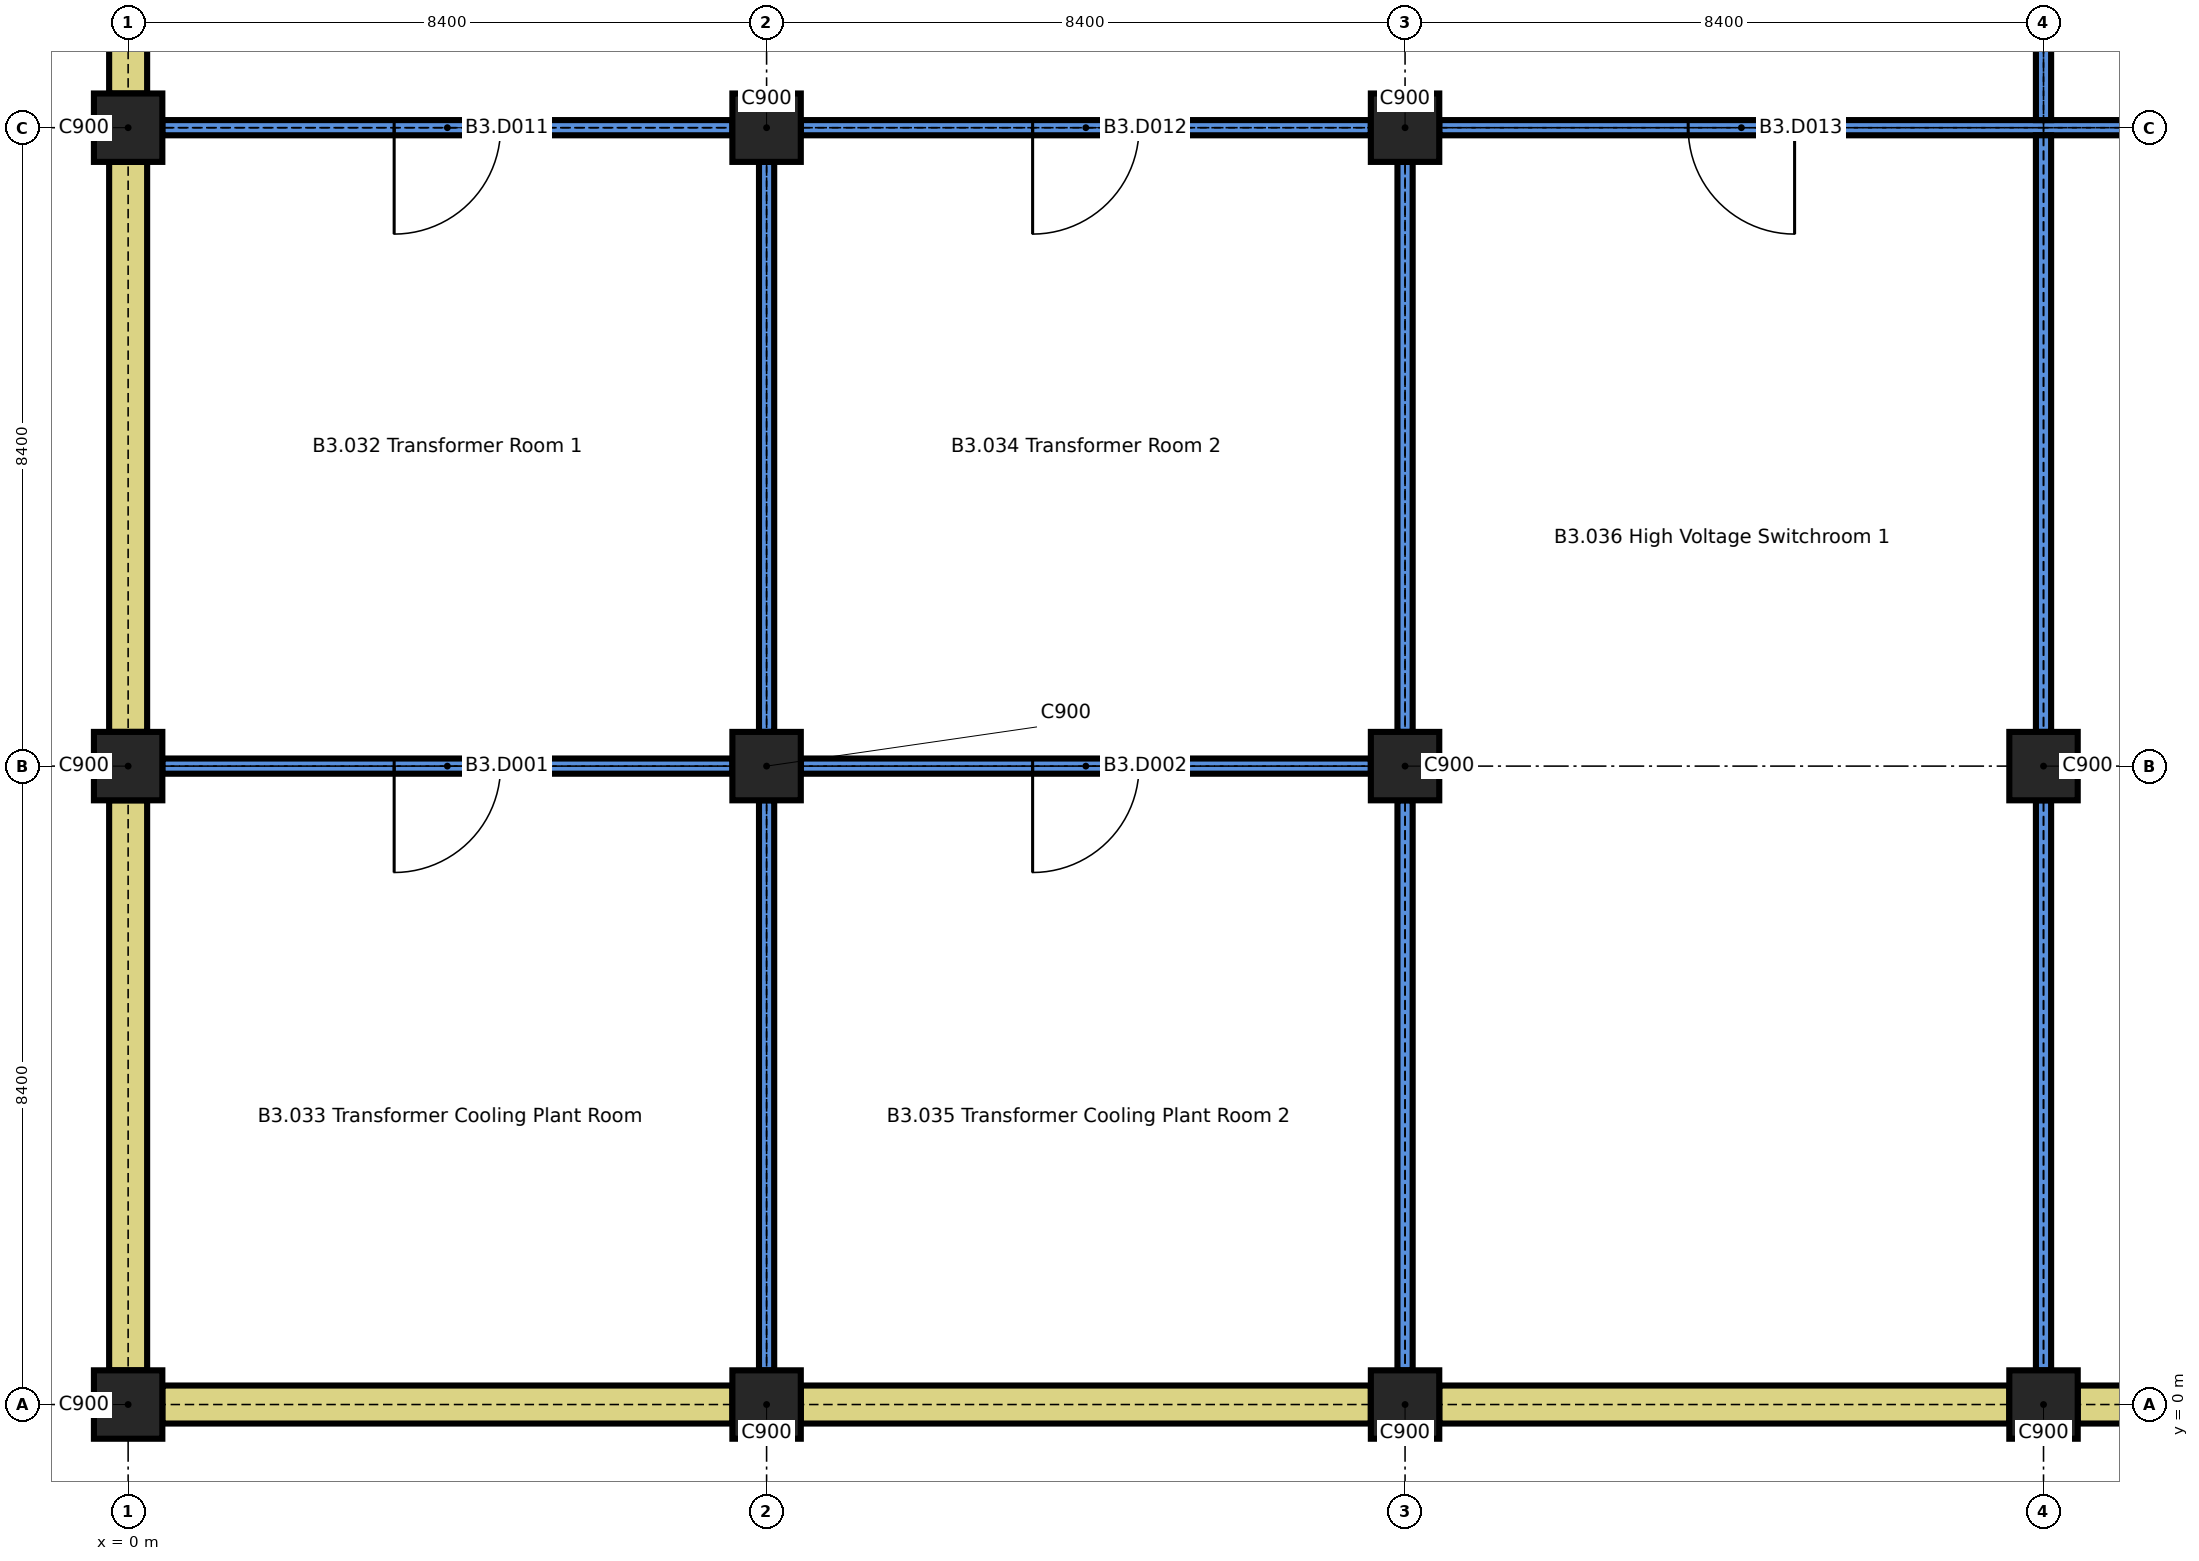
"""IFC4 building model, lengths in metres.
Left out: names, types, materials, properties, quantities, classifications, styles, units other than length and angle.
Written with IfcOpenShell. Run it as: python <this file> out.ifc"""

import sys

from ifc_helpers import new_model, si_unit, direction, frame, frame_2d, origin, origin_2d, place, context, subcontext, project, spatial, rectangle, extrude, element, fill, save


model = new_model("IFC4")
c1 = context("Model", 3, precision=1e-05, world=origin(), true_north=direction((0.0, 1.0)))
c2 = subcontext(c1, "Body", "Model", "MODEL_VIEW")
j1 = project(units=[si_unit("LENGTHUNIT", "METRE"), si_unit("PLANEANGLEUNIT", "RADIAN")], contexts=[c1])
p1 = place(None, origin())
s1 = spatial("IfcSite", under=j1, at=p1, CompositionType="ELEMENT")
p2 = place(p1, origin())
s2 = spatial("IfcBuilding", under=s1, at=p2, CompositionType="ELEMENT")
p3 = place(p2, frame((0.0, 0.0, -11.4)))
s3 = spatial("IfcBuildingStorey", under=s2, at=p3, CompositionType="ELEMENT", Elevation=-11.4)
for number, where, z_axis, x_axis in (
    (1, (0.0, 0.0, 0.0), (0.0, 0.0, 1.0), (1.0, 0.0, 0.0)),
    (2, (8.4, 0.0, 0.0), (0.0, 0.0, 1.0), (1.0, 0.0, 0.0)),
    (3, (16.8, 0.0, 0.0), (0.0, 0.0, 1.0), (1.0, 0.0, 0.0)),
    (4, (25.2, 0.0, 0.0), (0.0, 0.0, 1.0), (1.0, 0.0, 0.0)),
    (5, (0.0, 8.4, 0.0), (0.0, 0.0, 1.0), (1.0, 0.0, 0.0)),
    (6, (8.4, 8.4, 0.0), (0.0, 0.0, 1.0), (1.0, 0.0, 0.0)),
    (7, (16.8, 8.4, 0.0), (0.0, 0.0, 1.0), (1.0, 0.0, 0.0)),
    (8, (25.2, 8.4, 0.0), (0.0, 0.0, 1.0), (1.0, 0.0, 0.0)),
    (9, (0.0, 16.8, 0.0), (0.0, 0.0, 1.0), (1.0, 0.0, 0.0)),
    (10, (8.4, 16.8, 0.0), (0.0, 0.0, 1.0), (1.0, 0.0, 0.0)),
    (11, (16.8, 16.8, 0.0), (0.0, 0.0, 1.0), (1.0, 0.0, 0.0)),
):
    element("IfcColumn", number, at=place(p3, frame(where, z_axis=z_axis, x_axis=x_axis)), inside=s3, PredefinedType="COLUMN", context=c2, shape_type="SweptSolid", body=[
        extrude(rectangle(XDim=0.9, YDim=0.9, at=origin_2d()), origin(), (0.0, 0.0, 1.0), 3.2),
    ])
for number, where, z_axis, x_axis in (
    (12, (0.45, 0.0, 0.0), (0.0, 0.0, 1.0), (1.0, 0.0, 0.0)),
    (13, (8.85, 0.0, 0.0), (0.0, 0.0, 1.0), (1.0, 0.0, 0.0)),
    (14, (17.25, 0.0, 0.0), (0.0, 0.0, 1.0), (1.0, 0.0, 0.0)),
    (15, (25.65, 0.0, 0.0), (0.0, 0.0, 1.0), (1.0, 0.0, 0.0)),
    (16, (0.0, 0.45, 0.0), (0.0, 0.0, 1.0), (0.0, 1.0, 0.0)),
    (17, (0.0, 8.85, 0.0), (0.0, 0.0, 1.0), (0.0, 1.0, 0.0)),
):
    element("IfcWall", number, at=place(p3, frame(where, z_axis=z_axis, x_axis=x_axis)), inside=s3, PredefinedType="SOLIDWALL", context=c2, shape_type="SweptSolid", body=[
        extrude(rectangle(XDim=7.5, YDim=0.5, at=frame_2d((3.75, 0.0))), origin(), (0.0, 0.0, 1.0), 3.2),
    ])
p4 = place(p3, frame((0.0, 17.25, 0.0), z_axis=(0.0, 0.0, 1.0), x_axis=(0.0, 1.0, 0.0)))
e18 = element("IfcWall", 18, at=p4, inside=s3, PredefinedType="SOLIDWALL", context=c2, shape_type="SweptSolid", body=[
    extrude(rectangle(XDim=16.6, YDim=0.5, at=frame_2d((8.3, 0.0))), origin(), (0.0, 0.0, 1.0), 3.2),
])
p5 = place(p3, frame((0.45, 8.4, 0.0), z_axis=(0.0, 0.0, 1.0), x_axis=(1.0, 0.0, 0.0)))
e19 = element("IfcWall", 19, at=p5, inside=s3, PredefinedType="PARTITIONING", context=c2, shape_type="SweptSolid", body=[
    extrude(rectangle(XDim=7.5, YDim=0.2, at=frame_2d((3.75, 0.0))), origin(), (0.0, 0.0, 1.0), 3.2),
])
p6 = place(p5, frame((3.05, 0.0, 0.0)))
e20 = element("IfcOpeningElement", 20, at=p6, cuts=e19, PredefinedType="OPENING", context=c2, shape_type="SweptSolid", body=[
    extrude(rectangle(XDim=1.4, YDim=2.1, at=frame_2d((0.7, 1.05))), frame((0.0, 0.11, 0.0), z_axis=(0.0, -1.0, 0.0), x_axis=(1.0, 0.0, 0.0)), (0.0, 0.0, 1.0), 0.22),
])
p7 = place(p3, frame((8.85, 8.4, 0.0), z_axis=(0.0, 0.0, 1.0), x_axis=(1.0, 0.0, 0.0)))
e21 = element("IfcWall", 21, at=p7, inside=s3, PredefinedType="PARTITIONING", context=c2, shape_type="SweptSolid", body=[
    extrude(rectangle(XDim=7.5, YDim=0.2, at=frame_2d((3.75, 0.0))), origin(), (0.0, 0.0, 1.0), 3.2),
])
p8 = place(p7, frame((3.05, 0.0, 0.0)))
e22 = element("IfcOpeningElement", 22, at=p8, cuts=e21, PredefinedType="OPENING", context=c2, shape_type="SweptSolid", body=[
    extrude(rectangle(XDim=1.4, YDim=2.1, at=frame_2d((0.7, 1.05))), frame((0.0, 0.11, 0.0), z_axis=(0.0, -1.0, 0.0), x_axis=(1.0, 0.0, 0.0)), (0.0, 0.0, 1.0), 0.22),
])
p9 = place(p3, frame((0.45, 16.8, 0.0), z_axis=(0.0, 0.0, 1.0), x_axis=(1.0, 0.0, 0.0)))
e23 = element("IfcWall", 23, at=p9, inside=s3, PredefinedType="PARTITIONING", context=c2, shape_type="SweptSolid", body=[
    extrude(rectangle(XDim=7.5, YDim=0.2, at=frame_2d((3.75, 0.0))), origin(), (0.0, 0.0, 1.0), 3.2),
])
p10 = place(p9, frame((3.05, 0.0, 0.0)))
e24 = element("IfcOpeningElement", 24, at=p10, cuts=e23, PredefinedType="OPENING", context=c2, shape_type="SweptSolid", body=[
    extrude(rectangle(XDim=1.4, YDim=2.1, at=frame_2d((0.7, 1.05))), frame((0.0, 0.11, 0.0), z_axis=(0.0, -1.0, 0.0), x_axis=(1.0, 0.0, 0.0)), (0.0, 0.0, 1.0), 0.22),
])
p11 = place(p3, frame((8.85, 16.8, 0.0), z_axis=(0.0, 0.0, 1.0), x_axis=(1.0, 0.0, 0.0)))
e25 = element("IfcWall", 25, at=p11, inside=s3, PredefinedType="PARTITIONING", context=c2, shape_type="SweptSolid", body=[
    extrude(rectangle(XDim=7.5, YDim=0.2, at=frame_2d((3.75, 0.0))), origin(), (0.0, 0.0, 1.0), 3.2),
])
p12 = place(p11, frame((3.05, 0.0, 0.0)))
e26 = element("IfcOpeningElement", 26, at=p12, cuts=e25, PredefinedType="OPENING", context=c2, shape_type="SweptSolid", body=[
    extrude(rectangle(XDim=1.4, YDim=2.1, at=frame_2d((0.7, 1.05))), frame((0.0, 0.11, 0.0), z_axis=(0.0, -1.0, 0.0), x_axis=(1.0, 0.0, 0.0)), (0.0, 0.0, 1.0), 0.22),
])
p13 = place(p3, frame((17.25, 16.8, 0.0), z_axis=(0.0, 0.0, 1.0), x_axis=(1.0, 0.0, 0.0)))
e27 = element("IfcWall", 27, at=p13, inside=s3, PredefinedType="PARTITIONING", context=c2, shape_type="SweptSolid", body=[
    extrude(rectangle(XDim=15.9, YDim=0.2, at=frame_2d((7.95, 0.0))), origin(), (0.0, 0.0, 1.0), 3.2),
])
p14 = place(p13, frame((3.275, 0.0, 0.0)))
e28 = element("IfcOpeningElement", 28, at=p14, cuts=e27, PredefinedType="OPENING", context=c2, shape_type="SweptSolid", body=[
    extrude(rectangle(XDim=1.4, YDim=2.1, at=frame_2d((0.7, 1.05))), frame((0.0, 0.11, 0.0), z_axis=(0.0, -1.0, 0.0), x_axis=(1.0, 0.0, 0.0)), (0.0, 0.0, 1.0), 0.22),
])
p15 = place(p13, frame((13.325, 0.0, 0.0)))
e29 = element("IfcOpeningElement", 29, at=p15, cuts=e27, PredefinedType="OPENING", context=c2, shape_type="SweptSolid", body=[
    extrude(rectangle(XDim=1.4, YDim=2.1, at=frame_2d((0.7, 1.05))), frame((0.0, 0.11, 0.0), z_axis=(0.0, -1.0, 0.0), x_axis=(1.0, 0.0, 0.0)), (0.0, 0.0, 1.0), 0.22),
])
for number, where, z_axis, x_axis in (
    (30, (8.4, 0.45, 0.0), (0.0, 0.0, 1.0), (0.0, 1.0, 0.0)),
    (31, (8.4, 8.85, 0.0), (0.0, 0.0, 1.0), (0.0, 1.0, 0.0)),
    (32, (16.8, 0.45, 0.0), (0.0, 0.0, 1.0), (0.0, 1.0, 0.0)),
    (33, (16.8, 8.85, 0.0), (0.0, 0.0, 1.0), (0.0, 1.0, 0.0)),
    (34, (25.2, 0.45, 0.0), (0.0, 0.0, 1.0), (0.0, 1.0, 0.0)),
):
    element("IfcWall", number, at=place(p3, frame(where, z_axis=z_axis, x_axis=x_axis)), inside=s3, PredefinedType="PARTITIONING", context=c2, shape_type="SweptSolid", body=[
        extrude(rectangle(XDim=7.5, YDim=0.2, at=frame_2d((3.75, 0.0))), origin(), (0.0, 0.0, 1.0), 3.2),
    ])
p16 = place(p3, frame((25.2, 8.85, 0.0), z_axis=(0.0, 0.0, 1.0), x_axis=(0.0, 1.0, 0.0)))
e35 = element("IfcWall", 35, at=p16, inside=s3, PredefinedType="PARTITIONING", context=c2, shape_type="SweptSolid", body=[
    extrude(rectangle(XDim=7.85, YDim=0.2, at=frame_2d((3.925, 0.0))), origin(), (0.0, 0.0, 1.0), 3.2),
])
p17 = place(p3, frame((25.2, 16.9, 0.0), z_axis=(0.0, 0.0, 1.0), x_axis=(0.0, 1.0, 0.0)))
e36 = element("IfcWall", 36, at=p17, inside=s3, PredefinedType="PARTITIONING", context=c2, shape_type="SweptSolid", body=[
    extrude(rectangle(XDim=4.5, YDim=0.2, at=frame_2d((2.25, 0.0))), origin(), (0.0, 0.0, 1.0), 3.2),
])
p18 = place(p17, frame((1.25, 0.0, 0.0)))
e37 = element("IfcOpeningElement", 37, at=p18, cuts=e36, PredefinedType="OPENING", context=c2, shape_type="SweptSolid", body=[
    extrude(rectangle(XDim=2.0, YDim=2.4, at=frame_2d((1.0, 1.2))), frame((0.0, 0.11, 0.0), z_axis=(0.0, -1.0, 0.0), x_axis=(1.0, 0.0, 0.0)), (0.0, 0.0, 1.0), 0.22),
])
p19 = place(p6, origin())
e38 = element("IfcDoor", 38, at=p19, inside=s3, OperationType="SINGLE_SWING_LEFT", PredefinedType="DOOR", context=c2, shape_type="SweptSolid", body=[
    extrude(rectangle(XDim=1.4, YDim=2.1, at=frame_2d((0.7, 1.05))), frame((0.0, 0.025, 0.0), z_axis=(0.0, -1.0, 0.0), x_axis=(1.0, 0.0, 0.0)), (0.0, 0.0, 1.0), 0.05),
])
fill(e20, e38)
p20 = place(p8, origin())
e39 = element("IfcDoor", 39, at=p20, inside=s3, OperationType="SINGLE_SWING_LEFT", PredefinedType="DOOR", context=c2, shape_type="SweptSolid", body=[
    extrude(rectangle(XDim=1.4, YDim=2.1, at=frame_2d((0.7, 1.05))), frame((0.0, 0.025, 0.0), z_axis=(0.0, -1.0, 0.0), x_axis=(1.0, 0.0, 0.0)), (0.0, 0.0, 1.0), 0.05),
])
fill(e22, e39)
p21 = place(p10, origin())
e40 = element("IfcDoor", 40, at=p21, inside=s3, OperationType="SINGLE_SWING_LEFT", PredefinedType="DOOR", context=c2, shape_type="SweptSolid", body=[
    extrude(rectangle(XDim=1.4, YDim=2.1, at=frame_2d((0.7, 1.05))), frame((0.0, 0.025, 0.0), z_axis=(0.0, -1.0, 0.0), x_axis=(1.0, 0.0, 0.0)), (0.0, 0.0, 1.0), 0.05),
])
fill(e24, e40)
p22 = place(p12, origin())
e41 = element("IfcDoor", 41, at=p22, inside=s3, OperationType="SINGLE_SWING_LEFT", PredefinedType="DOOR", context=c2, shape_type="SweptSolid", body=[
    extrude(rectangle(XDim=1.4, YDim=2.1, at=frame_2d((0.7, 1.05))), frame((0.0, 0.025, 0.0), z_axis=(0.0, -1.0, 0.0), x_axis=(1.0, 0.0, 0.0)), (0.0, 0.0, 1.0), 0.05),
])
fill(e26, e41)
p23 = place(p14, origin())
e42 = element("IfcDoor", 42, at=p23, inside=s3, OperationType="SINGLE_SWING_RIGHT", PredefinedType="DOOR", context=c2, shape_type="SweptSolid", body=[
    extrude(rectangle(XDim=1.4, YDim=2.1, at=frame_2d((0.7, 1.05))), frame((0.0, 0.025, 0.0), z_axis=(0.0, -1.0, 0.0), x_axis=(1.0, 0.0, 0.0)), (0.0, 0.0, 1.0), 0.05),
])
fill(e28, e42)
save(model, sys.argv[1])
